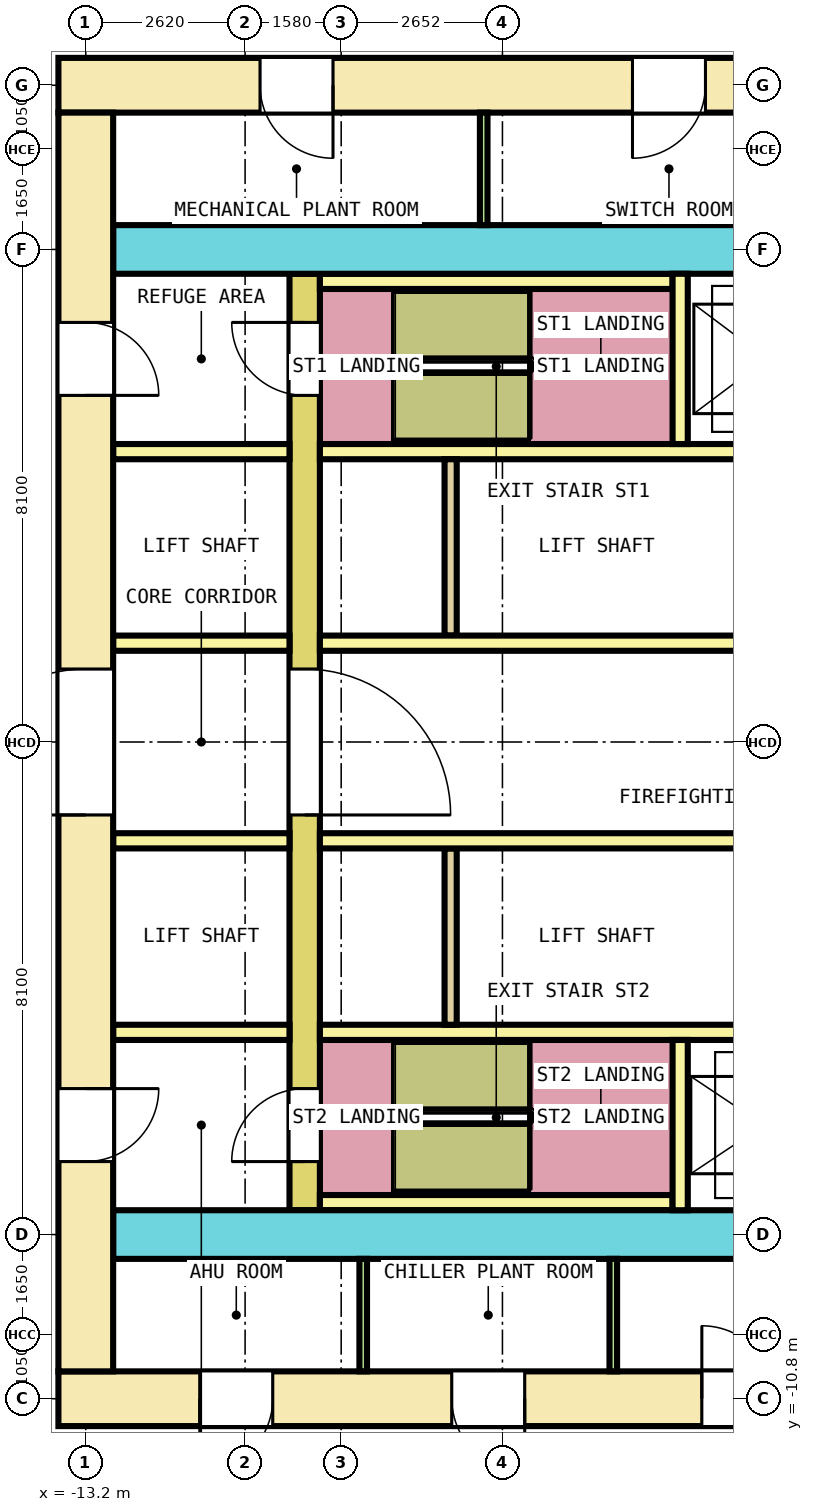
"""IFC4 building model, lengths in metres.
Left out: names, types, materials, properties, quantities, classifications, styles, units other than length and angle.
Written with IfcOpenShell. Run it as: python <this file> out.ifc"""

import sys

from ifc_helpers import new_model, si_unit, direction, frame, frame_2d, origin, place, context, subcontext, project, spatial, rectangle, extrude, element, fill, save


model = new_model("IFC4")
c1 = context("Model", 3, precision=1e-05, world=origin(), true_north=direction((0.0, 1.0)))
c2 = subcontext(c1, "Body", "Model", "MODEL_VIEW")
j1 = project(units=[si_unit("LENGTHUNIT", "METRE"), si_unit("PLANEANGLEUNIT", "RADIAN")], contexts=[c1])
p1 = place(None, origin())
s1 = spatial("IfcSite", under=j1, at=p1, CompositionType="ELEMENT")
p2 = place(p1, origin())
s2 = spatial("IfcBuilding", under=s1, at=p2, CompositionType="ELEMENT")
p3 = place(p2, frame((0.0, 0.0, -5.2)))
s3 = spatial("IfcBuildingStorey", under=s2, at=p3, CompositionType="ELEMENT", Elevation=-5.2)
p4 = place(p3, frame((-13.65, 10.8, 0.0), z_axis=(0.0, 0.0, 1.0), x_axis=(1.0, 0.0, 0.0)))
e1 = element("IfcWall", 1, at=p4, inside=s3, PredefinedType="SHEAR", context=c2, shape_type="SweptSolid", body=[
    extrude(rectangle(XDim=27.3, YDim=0.9, at=frame_2d((13.65, 0.0))), origin(), (0.0, 0.0, 1.0), 4.9),
])
p5 = place(p4, frame((3.316, 0.0, 0.0)))
e2 = element("IfcOpeningElement", 2, at=p5, cuts=e1, PredefinedType="OPENING", context=c2, shape_type="SweptSolid", body=[
    extrude(rectangle(XDim=1.2, YDim=2.1, at=frame_2d((0.6, 1.05))), frame((0.0, 0.46, 0.0), z_axis=(0.0, -1.0, 0.0), x_axis=(1.0, 0.0, 0.0)), (0.0, 0.0, 1.0), 0.92),
])
p6 = place(p4, frame((9.441, 0.0, 0.0)))
e3 = element("IfcOpeningElement", 3, at=p6, cuts=e1, PredefinedType="OPENING", context=c2, shape_type="SweptSolid", body=[
    extrude(rectangle(XDim=1.2, YDim=2.1, at=frame_2d((0.6, 1.05))), frame((0.0, 0.46, 0.0), z_axis=(0.0, -1.0, 0.0), x_axis=(1.0, 0.0, 0.0)), (0.0, 0.0, 1.0), 0.92),
])
p7 = place(p4, frame((18.76, 0.0, 0.0)))
e4 = element("IfcOpeningElement", 4, at=p7, cuts=e1, PredefinedType="OPENING", context=c2, shape_type="SweptSolid", body=[
    extrude(rectangle(XDim=1.2, YDim=2.1, at=frame_2d((0.6, 1.05))), frame((0.0, 0.46, 0.0), z_axis=(0.0, -1.0, 0.0), x_axis=(1.0, 0.0, 0.0)), (0.0, 0.0, 1.0), 0.92),
])
p8 = place(p4, frame((23.484, 0.0, 0.0)))
e5 = element("IfcOpeningElement", 5, at=p8, cuts=e1, PredefinedType="OPENING", context=c2, shape_type="SweptSolid", body=[
    extrude(rectangle(XDim=1.2, YDim=2.1, at=frame_2d((0.6, 1.05))), frame((0.0, 0.46, 0.0), z_axis=(0.0, -1.0, 0.0), x_axis=(1.0, 0.0, 0.0)), (0.0, 0.0, 1.0), 0.92),
])
p9 = place(p4, frame((14.575, 0.0, 0.0)))
e6 = element("IfcOpeningElement", 6, at=p9, cuts=e1, PredefinedType="OPENING", context=c2, shape_type="SweptSolid", body=[
    extrude(rectangle(XDim=1.4, YDim=2.1, at=frame_2d((0.7, 1.05))), frame((0.0, 0.46, 0.0), z_axis=(0.0, -1.0, 0.0), x_axis=(1.0, 0.0, 0.0)), (0.0, 0.0, 1.0), 0.92),
])
p10 = place(p3, frame((-13.65, -10.8, 0.0), z_axis=(0.0, 0.0, 1.0), x_axis=(1.0, 0.0, 0.0)))
e7 = element("IfcWall", 7, at=p10, inside=s3, PredefinedType="SHEAR", context=c2, shape_type="SweptSolid", body=[
    extrude(rectangle(XDim=27.3, YDim=0.9, at=frame_2d((13.65, 0.0))), origin(), (0.0, 0.0, 1.0), 4.9),
])
p11 = place(p10, frame((2.325, 0.0, 0.0)))
e8 = element("IfcOpeningElement", 8, at=p11, cuts=e7, PredefinedType="OPENING", context=c2, shape_type="SweptSolid", body=[
    extrude(rectangle(XDim=1.2, YDim=2.1, at=frame_2d((0.6, 1.05))), frame((0.0, 0.46, 0.0), z_axis=(0.0, -1.0, 0.0), x_axis=(1.0, 0.0, 0.0)), (0.0, 0.0, 1.0), 0.92),
])
p12 = place(p10, frame((6.469, 0.0, 0.0)))
e9 = element("IfcOpeningElement", 9, at=p12, cuts=e7, PredefinedType="OPENING", context=c2, shape_type="SweptSolid", body=[
    extrude(rectangle(XDim=1.2, YDim=2.1, at=frame_2d((0.6, 1.05))), frame((0.0, 0.46, 0.0), z_axis=(0.0, -1.0, 0.0), x_axis=(1.0, 0.0, 0.0)), (0.0, 0.0, 1.0), 0.92),
])
p13 = place(p10, frame((10.581, 0.0, 0.0)))
e10 = element("IfcOpeningElement", 10, at=p13, cuts=e7, PredefinedType="OPENING", context=c2, shape_type="SweptSolid", body=[
    extrude(rectangle(XDim=1.2, YDim=2.1, at=frame_2d((0.6, 1.05))), frame((0.0, 0.46, 0.0), z_axis=(0.0, -1.0, 0.0), x_axis=(1.0, 0.0, 0.0)), (0.0, 0.0, 1.0), 0.92),
])
p14 = place(p10, frame((19.772, 0.0, 0.0)))
e11 = element("IfcOpeningElement", 11, at=p14, cuts=e7, PredefinedType="OPENING", context=c2, shape_type="SweptSolid", body=[
    extrude(rectangle(XDim=1.2, YDim=2.1, at=frame_2d((0.6, 1.05))), frame((0.0, 0.46, 0.0), z_axis=(0.0, -1.0, 0.0), x_axis=(1.0, 0.0, 0.0)), (0.0, 0.0, 1.0), 0.92),
])
p15 = place(p10, frame((23.822, 0.0, 0.0)))
e12 = element("IfcOpeningElement", 12, at=p15, cuts=e7, PredefinedType="OPENING", context=c2, shape_type="SweptSolid", body=[
    extrude(rectangle(XDim=1.2, YDim=2.1, at=frame_2d((0.6, 1.05))), frame((0.0, 0.46, 0.0), z_axis=(0.0, -1.0, 0.0), x_axis=(1.0, 0.0, 0.0)), (0.0, 0.0, 1.0), 0.92),
])
p16 = place(p10, frame((15.2, 0.0, 0.0)))
e13 = element("IfcOpeningElement", 13, at=p16, cuts=e7, PredefinedType="OPENING", context=c2, shape_type="SweptSolid", body=[
    extrude(rectangle(XDim=1.2, YDim=2.1, at=frame_2d((0.6, 1.05))), frame((0.0, 0.46, 0.0), z_axis=(0.0, -1.0, 0.0), x_axis=(1.0, 0.0, 0.0)), (0.0, 0.0, 1.0), 0.92),
])
p17 = place(p3, frame((-13.2, -10.35, 0.0), z_axis=(0.0, 0.0, 1.0), x_axis=(0.0, 1.0, 0.0)))
e14 = element("IfcWall", 14, at=p17, inside=s3, PredefinedType="SHEAR", context=c2, shape_type="SweptSolid", body=[
    extrude(rectangle(XDim=20.7, YDim=0.9, at=frame_2d((10.35, 0.0))), origin(), (0.0, 0.0, 1.0), 4.9),
])
p18 = place(p17, frame((9.15, 0.0, 0.0)))
e15 = element("IfcOpeningElement", 15, at=p18, cuts=e14, PredefinedType="OPENING", context=c2, shape_type="SweptSolid", body=[
    extrude(rectangle(XDim=2.4, YDim=2.1, at=frame_2d((1.2, 1.05))), frame((0.0, 0.46, 0.0), z_axis=(0.0, -1.0, 0.0), x_axis=(1.0, 0.0, 0.0)), (0.0, 0.0, 1.0), 0.92),
])
p19 = place(p17, frame((16.05, 0.0, 0.0)))
e16 = element("IfcOpeningElement", 16, at=p19, cuts=e14, PredefinedType="OPENING", context=c2, shape_type="SweptSolid", body=[
    extrude(rectangle(XDim=1.2, YDim=2.1, at=frame_2d((0.6, 1.05))), frame((0.0, 0.46, 0.0), z_axis=(0.0, -1.0, 0.0), x_axis=(1.0, 0.0, 0.0)), (0.0, 0.0, 1.0), 0.92),
])
p20 = place(p17, frame((3.45, 0.0, 0.0)))
e17 = element("IfcOpeningElement", 17, at=p20, cuts=e14, PredefinedType="OPENING", context=c2, shape_type="SweptSolid", body=[
    extrude(rectangle(XDim=1.2, YDim=2.1, at=frame_2d((0.6, 1.05))), frame((0.0, 0.46, 0.0), z_axis=(0.0, -1.0, 0.0), x_axis=(1.0, 0.0, 0.0)), (0.0, 0.0, 1.0), 0.92),
])
p21 = place(p3, frame((-12.75, 8.1, 0.0), z_axis=(0.0, 0.0, 1.0), x_axis=(1.0, 0.0, 0.0)))
e18 = element("IfcWall", 18, at=p21, inside=s3, PredefinedType="SHEAR", context=c2, shape_type="SweptSolid", body=[
    extrude(rectangle(XDim=25.5, YDim=0.8, at=frame_2d((12.75, 0.0))), origin(), (0.0, 0.0, 1.0), 4.9),
])
p22 = place(p21, frame((13.675, 0.0, 0.0)))
e19 = element("IfcOpeningElement", 19, at=p22, cuts=e18, PredefinedType="OPENING", context=c2, shape_type="SweptSolid", body=[
    extrude(rectangle(XDim=1.4, YDim=2.1, at=frame_2d((0.7, 1.05))), frame((0.0, 0.41, 0.0), z_axis=(0.0, -1.0, 0.0), x_axis=(1.0, 0.0, 0.0)), (0.0, 0.0, 1.0), 0.82),
])
p23 = place(p3, frame((-12.75, -8.1, 0.0), z_axis=(0.0, 0.0, 1.0), x_axis=(1.0, 0.0, 0.0)))
e20 = element("IfcWall", 20, at=p23, inside=s3, PredefinedType="SHEAR", context=c2, shape_type="SweptSolid", body=[
    extrude(rectangle(XDim=25.5, YDim=0.8, at=frame_2d((12.75, 0.0))), origin(), (0.0, 0.0, 1.0), 4.9),
])
p24 = place(p23, frame((14.3, 0.0, 0.0)))
e21 = element("IfcOpeningElement", 21, at=p24, cuts=e20, PredefinedType="OPENING", context=c2, shape_type="SweptSolid", body=[
    extrude(rectangle(XDim=1.2, YDim=2.1, at=frame_2d((0.6, 1.05))), frame((0.0, 0.41, 0.0), z_axis=(0.0, -1.0, 0.0), x_axis=(1.0, 0.0, 0.0)), (0.0, 0.0, 1.0), 0.82),
])
p25 = place(p3, frame((-9.6, -7.7, 0.0), z_axis=(0.0, 0.0, 1.0), x_axis=(0.0, 1.0, 0.0)))
e22 = element("IfcWall", 22, at=p25, inside=s3, PredefinedType="SHEAR", context=c2, shape_type="SweptSolid", body=[
    extrude(rectangle(XDim=15.4, YDim=0.5, at=frame_2d((7.7, 0.0))), origin(), (0.0, 0.0, 1.0), 4.9),
])
p26 = place(p25, frame((6.5, 0.0, 0.0)))
e23 = element("IfcOpeningElement", 23, at=p26, cuts=e22, PredefinedType="OPENING", context=c2, shape_type="SweptSolid", body=[
    extrude(rectangle(XDim=2.4, YDim=2.1, at=frame_2d((1.2, 1.05))), frame((0.0, 0.26, 0.0), z_axis=(0.0, -1.0, 0.0), x_axis=(1.0, 0.0, 0.0)), (0.0, 0.0, 1.0), 0.52),
])
p27 = place(p25, frame((13.4, 0.0, 0.0)))
e24 = element("IfcOpeningElement", 24, at=p27, cuts=e22, PredefinedType="OPENING", context=c2, shape_type="SweptSolid", body=[
    extrude(rectangle(XDim=1.2, YDim=2.1, at=frame_2d((0.6, 1.05))), frame((0.0, 0.26, 0.0), z_axis=(0.0, -1.0, 0.0), x_axis=(1.0, 0.0, 0.0)), (0.0, 0.0, 1.0), 0.52),
])
p28 = place(p25, frame((0.8, 0.0, 0.0)))
e25 = element("IfcOpeningElement", 25, at=p28, cuts=e22, PredefinedType="OPENING", context=c2, shape_type="SweptSolid", body=[
    extrude(rectangle(XDim=1.2, YDim=2.1, at=frame_2d((0.6, 1.05))), frame((0.0, 0.26, 0.0), z_axis=(0.0, -1.0, 0.0), x_axis=(1.0, 0.0, 0.0)), (0.0, 0.0, 1.0), 0.52),
])
p29 = place(p3, frame((-12.75, 1.625, 0.0), z_axis=(0.0, 0.0, 1.0), x_axis=(1.0, 0.0, 0.0)))
e26 = element("IfcWall", 26, at=p29, inside=s3, PredefinedType="SOLIDWALL", context=c2, shape_type="SweptSolid", body=[
    extrude(rectangle(XDim=2.9, YDim=0.25, at=frame_2d((1.45, 0.0))), origin(), (0.0, 0.0, 1.0), 4.9),
])
p30 = place(p3, frame((-9.35, 1.625, 0.0), z_axis=(0.0, 0.0, 1.0), x_axis=(1.0, 0.0, 0.0)))
e27 = element("IfcWall", 27, at=p30, inside=s3, PredefinedType="SOLIDWALL", context=c2, shape_type="SweptSolid", body=[
    extrude(rectangle(XDim=18.7, YDim=0.25, at=frame_2d((9.35, 0.0))), origin(), (0.0, 0.0, 1.0), 4.9),
])
p31 = place(p3, frame((-12.75, 4.775, 0.0), z_axis=(0.0, 0.0, 1.0), x_axis=(1.0, 0.0, 0.0)))
e28 = element("IfcWall", 28, at=p31, inside=s3, PredefinedType="SOLIDWALL", context=c2, shape_type="SweptSolid", body=[
    extrude(rectangle(XDim=2.9, YDim=0.25, at=frame_2d((1.45, 0.0))), origin(), (0.0, 0.0, 1.0), 4.9),
])
p32 = place(p3, frame((-9.35, 4.775, 0.0), z_axis=(0.0, 0.0, 1.0), x_axis=(1.0, 0.0, 0.0)))
e29 = element("IfcWall", 29, at=p32, inside=s3, PredefinedType="SOLIDWALL", context=c2, shape_type="SweptSolid", body=[
    extrude(rectangle(XDim=18.7, YDim=0.25, at=frame_2d((9.35, 0.0))), origin(), (0.0, 0.0, 1.0), 4.9),
])
p33 = place(p3, frame((-7.2, 1.75, 0.0), z_axis=(0.0, 0.0, 1.0), x_axis=(0.0, 1.0, 0.0)))
e30 = element("IfcWall", 30, at=p33, inside=s3, PredefinedType="SOLIDWALL", context=c2, shape_type="SweptSolid", body=[
    extrude(rectangle(XDim=2.9, YDim=0.2, at=frame_2d((1.45, 0.0))), origin(), (0.0, 0.0, 1.0), 4.9),
])
p34 = place(p3, frame((-12.75, -1.625, 0.0), z_axis=(0.0, 0.0, 1.0), x_axis=(1.0, 0.0, 0.0)))
e31 = element("IfcWall", 31, at=p34, inside=s3, PredefinedType="SOLIDWALL", context=c2, shape_type="SweptSolid", body=[
    extrude(rectangle(XDim=2.9, YDim=0.25, at=frame_2d((1.45, 0.0))), origin(), (0.0, 0.0, 1.0), 4.9),
])
p35 = place(p3, frame((-9.35, -1.625, 0.0), z_axis=(0.0, 0.0, 1.0), x_axis=(1.0, 0.0, 0.0)))
e32 = element("IfcWall", 32, at=p35, inside=s3, PredefinedType="SOLIDWALL", context=c2, shape_type="SweptSolid", body=[
    extrude(rectangle(XDim=18.7, YDim=0.25, at=frame_2d((9.35, 0.0))), origin(), (0.0, 0.0, 1.0), 4.9),
])
p36 = place(p3, frame((-12.75, -4.775, 0.0), z_axis=(0.0, 0.0, 1.0), x_axis=(1.0, 0.0, 0.0)))
e33 = element("IfcWall", 33, at=p36, inside=s3, PredefinedType="SOLIDWALL", context=c2, shape_type="SweptSolid", body=[
    extrude(rectangle(XDim=2.9, YDim=0.25, at=frame_2d((1.45, 0.0))), origin(), (0.0, 0.0, 1.0), 4.9),
])
p37 = place(p3, frame((-9.35, -4.775, 0.0), z_axis=(0.0, 0.0, 1.0), x_axis=(1.0, 0.0, 0.0)))
e34 = element("IfcWall", 34, at=p37, inside=s3, PredefinedType="SOLIDWALL", context=c2, shape_type="SweptSolid", body=[
    extrude(rectangle(XDim=18.7, YDim=0.25, at=frame_2d((9.35, 0.0))), origin(), (0.0, 0.0, 1.0), 4.9),
])
p38 = place(p3, frame((-7.2, -4.65, 0.0), z_axis=(0.0, 0.0, 1.0), x_axis=(0.0, 1.0, 0.0)))
e35 = element("IfcWall", 35, at=p38, inside=s3, PredefinedType="SOLIDWALL", context=c2, shape_type="SweptSolid", body=[
    extrude(rectangle(XDim=2.9, YDim=0.2, at=frame_2d((1.45, 0.0))), origin(), (0.0, 0.0, 1.0), 4.9),
])
p39 = place(p3, frame((-9.35, 7.575, 0.0), z_axis=(0.0, 0.0, 1.0), x_axis=(1.0, 0.0, 0.0)))
e36 = element("IfcWall", 36, at=p39, inside=s3, PredefinedType="SOLIDWALL", context=c2, shape_type="SweptSolid", body=[
    extrude(rectangle(XDim=5.8, YDim=0.25, at=frame_2d((2.9, 0.0))), origin(), (0.0, 0.0, 1.0), 4.9),
])
p40 = place(p3, frame((-3.425, 4.9, 0.0), z_axis=(0.0, 0.0, 1.0), x_axis=(0.0, 1.0, 0.0)))
e37 = element("IfcWall", 37, at=p40, inside=s3, PredefinedType="SOLIDWALL", context=c2, shape_type="SweptSolid", body=[
    extrude(rectangle(XDim=2.8, YDim=0.25, at=frame_2d((1.4, 0.0))), origin(), (0.0, 0.0, 1.0), 4.9),
])
p41 = place(p3, frame((-9.35, -7.575, 0.0), z_axis=(0.0, 0.0, 1.0), x_axis=(1.0, 0.0, 0.0)))
e38 = element("IfcWall", 38, at=p41, inside=s3, PredefinedType="SOLIDWALL", context=c2, shape_type="SweptSolid", body=[
    extrude(rectangle(XDim=5.8, YDim=0.25, at=frame_2d((2.9, 0.0))), origin(), (0.0, 0.0, 1.0), 4.9),
])
p42 = place(p3, frame((-3.425, -7.7, 0.0), z_axis=(0.0, 0.0, 1.0), x_axis=(0.0, 1.0, 0.0)))
e39 = element("IfcWall", 39, at=p42, inside=s3, PredefinedType="SOLIDWALL", context=c2, shape_type="SweptSolid", body=[
    extrude(rectangle(XDim=2.8, YDim=0.25, at=frame_2d((1.4, 0.0))), origin(), (0.0, 0.0, 1.0), 4.9),
])
for number, where, z_axis, x_axis in (
    (40, (-6.656, 8.5, 0.0), (0.0, 0.0, 1.0), (0.0, 1.0, 0.0)),
    (41, (-8.637, -10.35, 0.0), (0.0, 0.0, 1.0), (0.0, 1.0, 0.0)),
    (42, (-4.525, -10.35, 0.0), (0.0, 0.0, 1.0), (0.0, 1.0, 0.0)),
):
    element("IfcWall", number, at=place(p3, frame(where, z_axis=z_axis, x_axis=x_axis)), inside=s3, PredefinedType="PARTITIONING", context=c2, shape_type="SweptSolid", body=[
        extrude(rectangle(XDim=1.85, YDim=0.125, at=frame_2d((0.925, 0.0))), origin(), (0.0, 0.0, 1.0), 4.9),
    ])
p43 = place(p26, origin())
e43 = element("IfcDoor", 43, at=p43, inside=s3, OperationType="DOUBLE_DOOR_SINGLE_SWING", PredefinedType="DOOR", context=c2, shape_type="SweptSolid", body=[
    extrude(rectangle(XDim=2.4, YDim=2.1, at=frame_2d((1.2, 1.05))), frame((0.0, 0.2, 0.0), z_axis=(0.0, -1.0, 0.0), x_axis=(1.0, 0.0, 0.0)), (0.0, 0.0, 1.0), 0.4),
])
fill(e23, e43)
p44 = place(p18, origin())
e44 = element("IfcDoor", 44, at=p44, inside=s3, OperationType="DOUBLE_DOOR_SINGLE_SWING", PredefinedType="DOOR", context=c2, shape_type="SweptSolid", body=[
    extrude(rectangle(XDim=2.4, YDim=2.1, at=frame_2d((1.2, 1.05))), frame((0.0, 0.3, 0.0), z_axis=(0.0, -1.0, 0.0), x_axis=(1.0, 0.0, 0.0)), (0.0, 0.0, 1.0), 0.6),
])
fill(e15, e44)
p45 = place(p27, origin())
e45 = element("IfcDoor", 45, at=p45, inside=s3, OperationType="SINGLE_SWING_RIGHT", PredefinedType="DOOR", context=c2, shape_type="SweptSolid", body=[
    extrude(rectangle(XDim=1.2, YDim=2.1, at=frame_2d((0.6, 1.05))), frame((0.0, 0.2, 0.0), z_axis=(0.0, -1.0, 0.0), x_axis=(1.0, 0.0, 0.0)), (0.0, 0.0, 1.0), 0.4),
])
fill(e24, e45)
p46 = place(p19, origin())
e46 = element("IfcDoor", 46, at=p46, inside=s3, OperationType="SINGLE_SWING_LEFT", PredefinedType="DOOR", context=c2, shape_type="SweptSolid", body=[
    extrude(rectangle(XDim=1.2, YDim=2.1, at=frame_2d((0.6, 1.05))), frame((0.0, 0.3, 0.0), z_axis=(0.0, -1.0, 0.0), x_axis=(1.0, 0.0, 0.0)), (0.0, 0.0, 1.0), 0.6),
])
fill(e16, e46)
p47 = place(p28, origin())
e47 = element("IfcDoor", 47, at=p47, inside=s3, OperationType="SINGLE_SWING_RIGHT", PredefinedType="DOOR", context=c2, shape_type="SweptSolid", body=[
    extrude(rectangle(XDim=1.2, YDim=2.1, at=frame_2d((0.6, 1.05))), frame((0.0, 0.2, 0.0), z_axis=(0.0, -1.0, 0.0), x_axis=(1.0, 0.0, 0.0)), (0.0, 0.0, 1.0), 0.4),
])
fill(e25, e47)
p48 = place(p20, origin())
e48 = element("IfcDoor", 48, at=p48, inside=s3, OperationType="SINGLE_SWING_LEFT", PredefinedType="DOOR", context=c2, shape_type="SweptSolid", body=[
    extrude(rectangle(XDim=1.2, YDim=2.1, at=frame_2d((0.6, 1.05))), frame((0.0, 0.3, 0.0), z_axis=(0.0, -1.0, 0.0), x_axis=(1.0, 0.0, 0.0)), (0.0, 0.0, 1.0), 0.6),
])
fill(e17, e48)
p49 = place(p5, origin())
e49 = element("IfcDoor", 49, at=p49, inside=s3, OperationType="SINGLE_SWING_RIGHT", PredefinedType="DOOR", context=c2, shape_type="SweptSolid", body=[
    extrude(rectangle(XDim=1.2, YDim=2.1, at=frame_2d((0.6, 1.05))), frame((0.0, 0.3, 0.0), z_axis=(0.0, -1.0, 0.0), x_axis=(1.0, 0.0, 0.0)), (0.0, 0.0, 1.0), 0.6),
])
fill(e2, e49)
p50 = place(p6, origin())
e50 = element("IfcDoor", 50, at=p50, inside=s3, OperationType="SINGLE_SWING_LEFT", PredefinedType="DOOR", context=c2, shape_type="SweptSolid", body=[
    extrude(rectangle(XDim=1.2, YDim=2.1, at=frame_2d((0.6, 1.05))), frame((0.0, 0.3, 0.0), z_axis=(0.0, -1.0, 0.0), x_axis=(1.0, 0.0, 0.0)), (0.0, 0.0, 1.0), 0.6),
])
fill(e3, e50)
p51 = place(p11, origin())
e51 = element("IfcDoor", 51, at=p51, inside=s3, OperationType="SINGLE_SWING_LEFT", PredefinedType="DOOR", context=c2, shape_type="SweptSolid", body=[
    extrude(rectangle(XDim=1.2, YDim=2.1, at=frame_2d((0.6, 1.05))), frame((0.0, 0.3, 0.0), z_axis=(0.0, -1.0, 0.0), x_axis=(1.0, 0.0, 0.0)), (0.0, 0.0, 1.0), 0.6),
])
fill(e8, e51)
p52 = place(p12, origin())
e52 = element("IfcDoor", 52, at=p52, inside=s3, OperationType="SINGLE_SWING_RIGHT", PredefinedType="DOOR", context=c2, shape_type="SweptSolid", body=[
    extrude(rectangle(XDim=1.2, YDim=2.1, at=frame_2d((0.6, 1.05))), frame((0.0, 0.3, 0.0), z_axis=(0.0, -1.0, 0.0), x_axis=(1.0, 0.0, 0.0)), (0.0, 0.0, 1.0), 0.6),
])
fill(e9, e52)
p53 = place(p13, origin())
e53 = element("IfcDoor", 53, at=p53, inside=s3, OperationType="SINGLE_SWING_LEFT", PredefinedType="DOOR", context=c2, shape_type="SweptSolid", body=[
    extrude(rectangle(XDim=1.2, YDim=2.1, at=frame_2d((0.6, 1.05))), frame((0.0, 0.3, 0.0), z_axis=(0.0, -1.0, 0.0), x_axis=(1.0, 0.0, 0.0)), (0.0, 0.0, 1.0), 0.6),
])
fill(e10, e53)
save(model, sys.argv[1])
